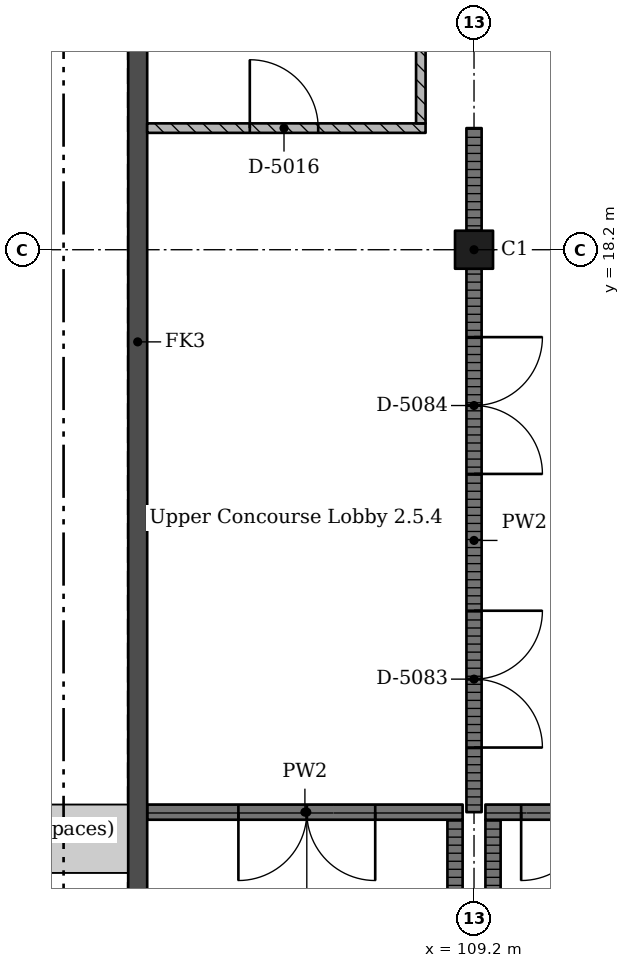
"""IFC4 building model, lengths in metres.
Left out: names, types, materials, properties, quantities, classifications, styles, units other than length and angle.
Written with IfcOpenShell. Run it as: python <this file> out.ifc"""

import sys

from ifc_helpers import new_model, si_unit, direction, frame, frame_2d, origin, origin_2d, place, context, subcontext, project, spatial, rectangle, extrude, element, fill, save


model = new_model("IFC4")
c1 = context("Model", 3, precision=1e-05, world=origin(), true_north=direction((0.0, 1.0)))
c2 = subcontext(c1, "Body", "Model", "MODEL_VIEW")
j1 = project(units=[si_unit("LENGTHUNIT", "METRE"), si_unit("PLANEANGLEUNIT", "RADIAN")], contexts=[c1])
p1 = place(None, origin())
s1 = spatial("IfcSite", under=j1, at=p1, CompositionType="ELEMENT")
p2 = place(p1, origin())
s2 = spatial("IfcBuilding", under=s1, at=p2, CompositionType="ELEMENT")
p3 = place(p2, frame((0.0, 0.0, 24.57)))
s3 = spatial("IfcBuildingStorey", under=s2, at=p3, CompositionType="ELEMENT", Elevation=24.57)
p4 = place(p3, frame((109.2, 18.2, 0.0), z_axis=(0.0, 0.0, 1.0), x_axis=(1.0, 0.0, 0.0)))
e1 = element("IfcColumn", 1, at=p4, inside=s3, PredefinedType="COLUMN", context=c2, shape_type="SweptSolid", body=[
    extrude(rectangle(XDim=0.5, YDim=0.5, at=origin_2d()), origin(), (0.0, 0.0, 1.0), 4.55),
])
p5 = place(p3, frame((104.775, 40.95, 0.0), z_axis=(0.0, 0.0, 1.0), x_axis=(0.0, -1.0, 0.0)))
e2 = element("IfcWall", 2, at=p5, inside=s3, PredefinedType="SHEAR", context=c2, shape_type="SweptSolid", body=[
    extrude(rectangle(XDim=31.85, YDim=0.25, at=frame_2d((15.925, 0.0))), origin(), (0.0, 0.0, 1.0), 4.55),
])
p6 = place(p3, frame((104.9, 19.8, 0.0), z_axis=(0.0, 0.0, 1.0), x_axis=(1.0, 0.0, 0.0)))
e3 = element("IfcWall", 3, at=p6, inside=s3, PredefinedType="PARTITIONING", context=c2, shape_type="SweptSolid", body=[
    extrude(rectangle(XDim=3.663, YDim=0.125, at=frame_2d((1.831, 0.0))), origin(), (0.0, 0.0, 1.0), 4.35),
])
p7 = place(p6, frame((1.35, 0.0, 0.0)))
e4 = element("IfcOpeningElement", 4, at=p7, cuts=e3, PredefinedType="OPENING", context=c2, shape_type="SweptSolid", body=[
    extrude(rectangle(XDim=0.9, YDim=2.1, at=frame_2d((0.45, 1.05))), frame((0.0, 0.073, 0.0), z_axis=(0.0, -1.0, 0.0), x_axis=(1.0, 0.0, 0.0)), (0.0, 0.0, 1.0), 0.145),
])
p8 = place(p3, frame((108.5, 19.863, 0.0), z_axis=(0.0, 0.0, 1.0), x_axis=(0.0, 1.0, 0.0)))
e5 = element("IfcWall", 5, at=p8, inside=s3, PredefinedType="PARTITIONING", context=c2, shape_type="SweptSolid", body=[
    extrude(rectangle(XDim=7.125, YDim=0.125, at=frame_2d((3.562, 0.0))), origin(), (0.0, 0.0, 1.0), 4.35),
])
p9 = place(p3, frame((108.95, 9.35, 0.0), z_axis=(0.0, 0.0, 1.0), x_axis=(0.0, 1.0, 0.0)))
e6 = element("IfcWall", 6, at=p9, inside=s3, PredefinedType="PARTITIONING", context=c2, shape_type="SweptSolid", body=[
    extrude(rectangle(XDim=1.35, YDim=0.2, at=frame_2d((0.675, 0.0))), origin(), (0.0, 0.0, 1.0), 4.35),
])
p10 = place(p3, frame((109.05, 10.8, 0.0), z_axis=(0.0, 0.0, 1.0), x_axis=(-1.0, 0.0, 0.0)))
e7 = element("IfcWall", 7, at=p10, inside=s3, PredefinedType="PARTITIONING", context=c2, shape_type="SweptSolid", body=[
    extrude(rectangle(XDim=4.15, YDim=0.2, at=frame_2d((2.075, 0.0))), origin(), (0.0, 0.0, 1.0), 4.35),
])
p11 = place(p10, frame((1.15, 0.0, 0.0)))
e8 = element("IfcOpeningElement", 8, at=p11, cuts=e7, PredefinedType="OPENING", context=c2, shape_type="SweptSolid", body=[
    extrude(rectangle(XDim=1.8, YDim=2.4, at=frame_2d((0.9, 1.2))), frame((0.0, 0.11, 0.0), z_axis=(0.0, -1.0, 0.0), x_axis=(1.0, 0.0, 0.0)), (0.0, 0.0, 1.0), 0.22),
])
p12 = place(p3, frame((109.2, 10.8, 0.0), z_axis=(0.0, 0.0, 1.0), x_axis=(0.0, 1.0, 0.0)))
e9 = element("IfcWall", 9, at=p12, inside=s3, PredefinedType="PARTITIONING", context=c2, shape_type="SweptSolid", body=[
    extrude(rectangle(XDim=7.15, YDim=0.2, at=frame_2d((3.575, 0.0))), origin(), (0.0, 0.0, 1.0), 3.6),
])
p13 = place(p12, frame((0.85, 0.0, 0.0)))
e10 = element("IfcOpeningElement", 10, at=p13, cuts=e9, PredefinedType="OPENING", context=c2, shape_type="SweptSolid", body=[
    extrude(rectangle(XDim=1.8, YDim=2.4, at=frame_2d((0.9, 1.2))), frame((0.0, 0.11, 0.0), z_axis=(0.0, -1.0, 0.0), x_axis=(1.0, 0.0, 0.0)), (0.0, 0.0, 1.0), 0.22),
])
p14 = place(p12, frame((4.45, 0.0, 0.0)))
e11 = element("IfcOpeningElement", 11, at=p14, cuts=e9, PredefinedType="OPENING", context=c2, shape_type="SweptSolid", body=[
    extrude(rectangle(XDim=1.8, YDim=2.4, at=frame_2d((0.9, 1.2))), frame((0.0, 0.11, 0.0), z_axis=(0.0, -1.0, 0.0), x_axis=(1.0, 0.0, 0.0)), (0.0, 0.0, 1.0), 0.22),
])
p15 = place(p3, frame((109.2, 18.45, 0.0), z_axis=(0.0, 0.0, 1.0), x_axis=(0.0, 1.0, 0.0)))
e12 = element("IfcWall", 12, at=p15, inside=s3, PredefinedType="PARTITIONING", context=c2, shape_type="SweptSolid", body=[
    extrude(rectangle(XDim=1.35, YDim=0.2, at=frame_2d((0.675, 0.0))), origin(), (0.0, 0.0, 1.0), 3.6),
])
p16 = place(p3, frame((109.45, 10.7, 0.0), z_axis=(0.0, 0.0, 1.0), x_axis=(0.0, -1.0, 0.0)))
e13 = element("IfcWall", 13, at=p16, inside=s3, PredefinedType="PARTITIONING", context=c2, shape_type="SweptSolid", body=[
    extrude(rectangle(XDim=1.35, YDim=0.2, at=frame_2d((0.675, 0.0))), origin(), (0.0, 0.0, 1.0), 4.35),
])
p17 = place(p3, frame((112.17, 10.8, 0.0), z_axis=(0.0, 0.0, 1.0), x_axis=(-1.0, 0.0, 0.0)))
e14 = element("IfcWall", 14, at=p17, inside=s3, PredefinedType="PARTITIONING", context=c2, shape_type="SweptSolid", body=[
    extrude(rectangle(XDim=2.82, YDim=0.2, at=frame_2d((1.41, 0.0))), origin(), (0.0, 0.0, 1.0), 4.35),
])
p18 = place(p17, frame((0.55, 0.0, 0.0)))
e15 = element("IfcOpeningElement", 15, at=p18, cuts=e14, PredefinedType="OPENING", context=c2, shape_type="SweptSolid", body=[
    extrude(rectangle(XDim=1.8, YDim=2.4, at=frame_2d((0.9, 1.2))), frame((0.0, 0.11, 0.0), z_axis=(0.0, -1.0, 0.0), x_axis=(1.0, 0.0, 0.0)), (0.0, 0.0, 1.0), 0.22),
])
p19 = place(p7, origin())
e16 = element("IfcDoor", 16, at=p19, inside=s3, OperationType="SINGLE_SWING_RIGHT", PredefinedType="DOOR", context=c2, shape_type="SweptSolid", body=[
    extrude(rectangle(XDim=0.9, YDim=2.1, at=frame_2d((0.45, 1.05))), frame((0.0, 0.025, 0.0), z_axis=(0.0, -1.0, 0.0), x_axis=(1.0, 0.0, 0.0)), (0.0, 0.0, 1.0), 0.05),
])
fill(e4, e16)
p20 = place(p13, origin())
e17 = element("IfcDoor", 17, at=p20, inside=s3, OperationType="DOUBLE_DOOR_SINGLE_SWING", PredefinedType="DOOR", context=c2, shape_type="SweptSolid", body=[
    extrude(rectangle(XDim=1.8, YDim=2.4, at=frame_2d((0.9, 1.2))), frame((0.0, 0.025, 0.0), z_axis=(0.0, -1.0, 0.0), x_axis=(1.0, 0.0, 0.0)), (0.0, 0.0, 1.0), 0.05),
])
fill(e10, e17)
p21 = place(p14, origin())
e18 = element("IfcDoor", 18, at=p21, inside=s3, OperationType="DOUBLE_DOOR_SINGLE_SWING", PredefinedType="DOOR", context=c2, shape_type="SweptSolid", body=[
    extrude(rectangle(XDim=1.8, YDim=2.4, at=frame_2d((0.9, 1.2))), frame((0.0, 0.025, 0.0), z_axis=(0.0, -1.0, 0.0), x_axis=(1.0, 0.0, 0.0)), (0.0, 0.0, 1.0), 0.05),
])
fill(e11, e18)
p22 = place(p18, origin())
e19 = element("IfcDoor", 19, at=p22, inside=s3, OperationType="DOUBLE_DOOR_SINGLE_SWING", PredefinedType="DOOR", context=c2, shape_type="SweptSolid", body=[
    extrude(rectangle(XDim=1.8, YDim=2.4, at=frame_2d((0.9, 1.2))), frame((0.0, 0.025, 0.0), z_axis=(0.0, -1.0, 0.0), x_axis=(1.0, 0.0, 0.0)), (0.0, 0.0, 1.0), 0.05),
])
fill(e15, e19)
p23 = place(p11, origin())
e20 = element("IfcDoor", 20, at=p23, inside=s3, OperationType="DOUBLE_DOOR_SINGLE_SWING", PredefinedType="DOOR", context=c2, shape_type="SweptSolid", body=[
    extrude(rectangle(XDim=1.8, YDim=2.4, at=frame_2d((0.9, 1.2))), frame((0.0, 0.025, 0.0), z_axis=(0.0, -1.0, 0.0), x_axis=(1.0, 0.0, 0.0)), (0.0, 0.0, 1.0), 0.05),
])
fill(e8, e20)
save(model, sys.argv[1])
